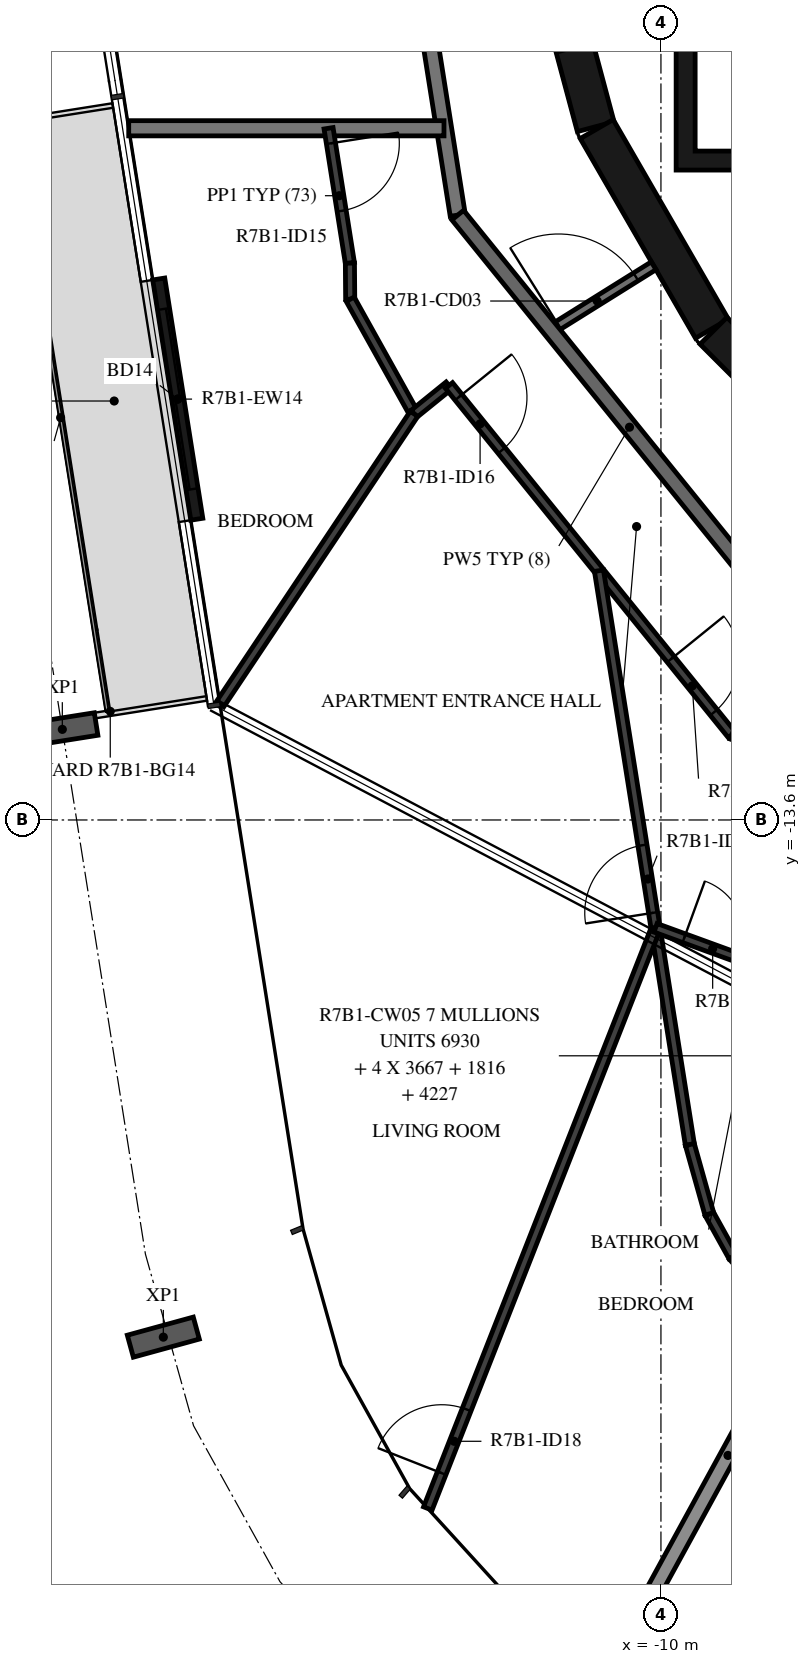
"""IFC4 building model, lengths in metres.
Left out: names, types, materials, properties, quantities, classifications, styles, units other than length and angle.
Written with IfcOpenShell. Run it as: python <this file> out.ifc"""

import sys

from ifc_helpers import new_model, si_unit, direction, frame, frame_2d, origin, origin_2d, place, context, subcontext, project, spatial, polyline, rectangle, i_section, outline, extrude, element, fill, save


model = new_model("IFC4")
c1 = context("Model", 3, precision=1e-05, world=origin(), true_north=direction((0.0, 1.0)))
c2 = subcontext(c1, "Body", "Model", "MODEL_VIEW")
j1 = project(units=[si_unit("LENGTHUNIT", "METRE"), si_unit("PLANEANGLEUNIT", "RADIAN")], contexts=[c1])
p1 = place(None, origin())
s1 = spatial("IfcSite", under=j1, at=p1, CompositionType="ELEMENT")
p2 = place(p1, origin())
s2 = spatial("IfcBuilding", under=s1, at=p2, CompositionType="ELEMENT")
p3 = place(p2, frame((0.0, 0.0, 273.9)))
s3 = spatial("IfcBuildingStorey", under=s2, at=p3, CompositionType="ELEMENT", Elevation=273.9)
for number, where, z_axis, x_axis in (
    (1, (-17.875, -12.408, -0.38), (0.0, 0.0, 1.0), (-0.156, 0.988, 0.0)),
    (2, (-16.547, -20.404, -0.38), (0.0, 0.0, 1.0), (-0.265, 0.964, 0.0)),
):
    element("IfcColumn", number, at=place(p3, frame(where, z_axis=z_axis, x_axis=x_axis)), inside=s3, PredefinedType="COLUMN", context=c2, shape_type="SweptSolid", body=[
        extrude(i_section(OverallWidth=0.3, OverallDepth=0.9, WebThickness=0.019, FlangeThickness=0.035, FilletRadius=0.03, at=origin_2d()), origin(), (0.0, 0.0, 1.0), 3.5),
    ])
p4 = place(p3, frame((-16.607, -6.483, 0.0), z_axis=(0.0, 0.0, 1.0), x_axis=(0.156401347891, -0.987693585267, 0.0)))
e3 = element("IfcWall", 3, at=p4, inside=s3, PredefinedType="STANDARD", context=c2, shape_type="SweptSolid", body=[
    extrude(rectangle(XDim=3.2, YDim=0.16, at=frame_2d((1.6, 0.0))), origin(), (0.0, 0.0, 1.0), 3.12),
])
p5 = place(p4, frame((0.4, 0.0, 0.0)))
e4 = element("IfcOpeningElement", 4, at=p5, cuts=e3, PredefinedType="OPENING", context=c2, shape_type="SweptSolid", body=[
    extrude(rectangle(XDim=2.4, YDim=2.4, at=frame_2d((1.2, 1.2))), frame((0.0, 0.09, 0.0), z_axis=(0.0, -1.0, 0.0), x_axis=(1.0, 0.0, 0.0)), (0.0, 0.0, 1.0), 0.18),
])
p6 = place(p3, frame((-11.643, -1.55, 0.0), z_axis=(0.0, 0.0, 1.0), x_axis=(0.258734743916, -0.965948410781, 0.0)))
e5 = element("IfcWall", 5, at=p6, inside=s3, PredefinedType="SHEAR", context=c2, shape_type="SweptSolid", body=[
    extrude(rectangle(XDim=3.033, YDim=0.5, at=frame_2d((1.516, 0.0))), origin(), (0.0, 0.0, 1.0), 3.12),
])
p7 = place(p6, frame((1.066, 0.0, 0.0)))
e6 = element("IfcOpeningElement", 6, at=p7, cuts=e5, PredefinedType="OPENING", context=c2, shape_type="SweptSolid", body=[
    extrude(rectangle(XDim=0.9, YDim=2.1, at=frame_2d((0.45, 1.05))), frame((0.0, 0.26, 0.0), z_axis=(0.0, -1.0, 0.0), x_axis=(1.0, 0.0, 0.0)), (0.0, 0.0, 1.0), 0.52),
])
p8 = place(p3, frame((-10.845, -4.51, 0.0), z_axis=(0.0, 0.0, 1.0), x_axis=(0.500087131594, -0.865975092491, 0.0)))
e7 = element("IfcWall", 7, at=p8, inside=s3, PredefinedType="SHEAR", context=c2, shape_type="SweptSolid", body=[
    extrude(rectangle(XDim=3.033, YDim=0.5, at=frame_2d((1.516, 0.0))), origin(), (0.0, 0.0, 1.0), 3.12),
])
p9 = place(p3, frame((-9.308, -7.164, 0.0), z_axis=(0.0, 0.0, 1.0), x_axis=(0.707106781187, -0.707106781187, 0.0)))
e8 = element("IfcWall", 8, at=p9, inside=s3, PredefinedType="SHEAR", context=c2, shape_type="SweptSolid", body=[
    extrude(rectangle(XDim=3.032, YDim=0.5, at=frame_2d((1.516, 0.0))), origin(), (0.0, 0.0, 1.0), 3.12),
])
p10 = place(p3, origin())
e9 = element("IfcWall", 9, at=p10, inside=s3, PredefinedType="SHEAR", context=c2, shape_type="SweptSolid", body=[
    extrude(outline(polyline([(9.8, -5.05), (9.8, -4.8), (9.8, -1.9), (9.55, -1.9), (9.55, -4.8), (7.65, -4.8), (7.65, -1.9), (7.4, -1.9), (7.4, -4.8), (5.5, -4.8), (5.5, -1.9), (5.25, -1.9), (5.25, -4.8), (3.35, -4.8), (3.35, -1.9), (3.1, -1.9), (3.1, -4.8), (1.2, -4.8), (1.2, -1.9), (0.95, -1.9), (0.95, -4.8), (-0.95, -4.8), (-0.95, -1.9), (-1.2, -1.9), (-1.2, -4.8), (-3.1, -4.8), (-3.1, -1.9), (-3.35, -1.9), (-3.35, -4.8), (-5.25, -4.8), (-5.25, -1.9), (-5.5, -1.9), (-5.5, -4.8), (-9.55, -4.8), (-9.55, -1.9), (-9.8, -1.9), (-9.8, -4.8), (-9.8, -5.05), (9.8, -5.05)])), origin(), (0.0, 0.0, 1.0), 3.12),
])
p11 = place(p3, frame((-11.449, -7.154, 0.0), z_axis=(0.0, 0.0, 1.0), x_axis=(0.848067047543, 0.529888934468, 0.0)))
e10 = element("IfcWall", 10, at=p11, inside=s3, PredefinedType="PARTITIONING", context=c2, shape_type="SweptSolid", body=[
    extrude(rectangle(XDim=1.596, YDim=0.12, at=frame_2d((0.798, 0.0))), origin(), (0.0, 0.0, 1.0), 3.12),
])
p12 = place(p11, frame((0.12, 0.0, 0.0)))
e11 = element("IfcOpeningElement", 11, at=p12, cuts=e10, PredefinedType="OPENING", context=c2, shape_type="SweptSolid", body=[
    extrude(rectangle(XDim=1.2, YDim=2.1, at=frame_2d((0.6, 1.05))), frame((0.0, 0.07, 0.0), z_axis=(0.0, -1.0, 0.0), x_axis=(1.0, 0.0, 0.0)), (0.0, 0.0, 1.0), 0.14),
])
p13 = place(p3, frame((-13.797, 1.45, 0.0), z_axis=(0.0, 0.0, 1.0), x_axis=(0.156421704315, -0.987690361611, 0.0)))
e12 = element("IfcWall", 12, at=p13, inside=s3, PredefinedType="STANDARD", context=c2, shape_type="SweptSolid", body=[
    extrude(rectangle(XDim=7.181, YDim=0.2, at=frame_2d((3.591, 0.0))), origin(), (0.0, 0.0, 1.0), 3.12),
])
p14 = place(p3, frame((-12.673, -5.643, 0.0), z_axis=(0.0, 0.0, 1.0), x_axis=(0.629302871585, -0.777160148113, 0.0)))
e13 = element("IfcWall", 13, at=p14, inside=s3, PredefinedType="STANDARD", context=c2, shape_type="SweptSolid", body=[
    extrude(rectangle(XDim=7.181, YDim=0.2, at=frame_2d((3.59, 0.0))), origin(), (0.0, 0.0, 1.0), 3.12),
])
p15 = place(p3, frame((-17.002, -4.5, 0.0), z_axis=(0.0, 0.0, 1.0), x_axis=(1.0, 0.0, 0.0)))
e14 = element("IfcWall", 14, at=p15, inside=s3, PredefinedType="STANDARD", context=c2, shape_type="SweptSolid", body=[
    extrude(rectangle(XDim=4.148, YDim=0.2, at=frame_2d((2.074, 0.0))), origin(), (0.0, 0.0, 1.0), 3.12),
])
p16 = place(p3, frame((-10.637, -24.738, 0.0), z_axis=(0.0, 0.0, 1.0), x_axis=(0.479683887596, 0.877441375808, 0.0)))
e15 = element("IfcWall", 15, at=p16, inside=s3, PredefinedType="STANDARD", context=c2, shape_type="SweptSolid", body=[
    extrude(rectangle(XDim=6.333, YDim=0.2, at=frame_2d((3.166, 0.0))), origin(), (0.0, 0.0, 1.0), 2.73),
])
p17 = place(p3, frame((-14.373, -4.5, 0.0), z_axis=(0.0, 0.0, 1.0), x_axis=(0.156437152886, -0.987687914878, 0.0)))
e16 = element("IfcWall", 16, at=p17, inside=s3, PredefinedType="PARTITIONING", context=c2, shape_type="SweptSolid", body=[
    extrude(rectangle(XDim=1.796, YDim=0.12, at=frame_2d((0.898, 0.0))), origin(), (0.0, 0.0, 1.0), 3.12),
])
p18 = place(p17, frame((0.2, 0.0, 0.0)))
e17 = element("IfcOpeningElement", 17, at=p18, cuts=e16, PredefinedType="OPENING", context=c2, shape_type="SweptSolid", body=[
    extrude(rectangle(XDim=0.9, YDim=2.1, at=frame_2d((0.45, 1.05))), frame((0.0, 0.07, 0.0), z_axis=(0.0, -1.0, 0.0), x_axis=(1.0, 0.0, 0.0)), (0.0, 0.0, 1.0), 0.14),
])
p19 = place(p3, frame((-14.092, -6.274, 0.0), z_axis=(0.0, 0.0, 1.0), x_axis=(0.008221715939, -0.999966201122, 0.0)))
e18 = element("IfcWall", 18, at=p19, inside=s3, PredefinedType="PARTITIONING", context=c2, shape_type="SweptSolid", body=[
    extrude(rectangle(XDim=0.475, YDim=0.12, at=frame_2d((0.238, 0.0))), origin(), (0.0, 0.0, 1.0), 3.12),
])
p20 = place(p3, frame((-14.088, -6.749, 0.0), z_axis=(0.0, 0.0, 1.0), x_axis=(0.486723752783, -0.873555944675, 0.0)))
e19 = element("IfcWall", 19, at=p20, inside=s3, PredefinedType="PARTITIONING", context=c2, shape_type="SweptSolid", body=[
    extrude(rectangle(XDim=1.726, YDim=0.12, at=frame_2d((0.863, 0.0))), origin(), (0.0, 0.0, 1.0), 3.12),
])
p21 = place(p3, frame((-13.248, -8.257, 0.0), z_axis=(0.0, 0.0, 1.0), x_axis=(0.777071947771, 0.629411779352, 0.0)))
e20 = element("IfcWall", 20, at=p21, inside=s3, PredefinedType="PARTITIONING", context=c2, shape_type="SweptSolid", body=[
    extrude(rectangle(XDim=0.592, YDim=0.12, at=frame_2d((0.296, 0.0))), origin(), (0.0, 0.0, 1.0), 3.12),
])
p22 = place(p3, frame((-12.788, -7.884, 0.0), z_axis=(0.0, 0.0, 1.0), x_axis=(0.6293312414, -0.777137174891, 0.0)))
e21 = element("IfcWall", 21, at=p22, inside=s3, PredefinedType="PARTITIONING", context=c2, shape_type="SweptSolid", body=[
    extrude(rectangle(XDim=5.913, YDim=0.12, at=frame_2d((2.957, 0.0))), origin(), (0.0, 0.0, 1.0), 3.12),
])
p23 = place(p22, frame((0.2, 0.0, 0.0)))
e22 = element("IfcOpeningElement", 22, at=p23, cuts=e21, PredefinedType="OPENING", context=c2, shape_type="SweptSolid", body=[
    extrude(rectangle(XDim=0.9, YDim=2.1, at=frame_2d((0.45, 1.05))), frame((0.0, 0.07, 0.0), z_axis=(0.0, -1.0, 0.0), x_axis=(1.0, 0.0, 0.0)), (0.0, 0.0, 1.0), 0.14),
])
p24 = place(p22, frame((4.635, 0.0, 0.0)))
e23 = element("IfcOpeningElement", 23, at=p24, cuts=e21, PredefinedType="OPENING", context=c2, shape_type="SweptSolid", body=[
    extrude(rectangle(XDim=0.9, YDim=2.1, at=frame_2d((0.45, 1.05))), frame((0.0, 0.07, 0.0), z_axis=(0.0, -1.0, 0.0), x_axis=(1.0, 0.0, 0.0)), (0.0, 0.0, 1.0), 0.14),
])
p25 = place(p3, frame((-9.067, -12.479, 0.0), z_axis=(0.0, 0.0, 1.0), x_axis=(0.933579449035, -0.358370495911, 0.0)))
e24 = element("IfcWall", 24, at=p25, inside=s3, PredefinedType="PARTITIONING", context=c2, shape_type="SweptSolid", body=[
    extrude(rectangle(XDim=7.985, YDim=0.12, at=frame_2d((3.992, 0.0))), origin(), (0.0, 0.0, 1.0), 3.12),
])
p26 = place(p25, frame((4.192, 0.0, 0.0)))
e25 = element("IfcOpeningElement", 25, at=p26, cuts=e24, PredefinedType="OPENING", context=c2, shape_type="SweptSolid", body=[
    extrude(rectangle(XDim=0.9, YDim=2.1, at=frame_2d((0.45, 1.05))), frame((0.0, 0.07, 0.0), z_axis=(0.0, -1.0, 0.0), x_axis=(1.0, 0.0, 0.0)), (0.0, 0.0, 1.0), 0.14),
])
p27 = place(p3, frame((-15.802, -12.08, 0.0), z_axis=(0.0, 0.0, 1.0), x_axis=(0.555386305099, 0.831592479589, 0.0)))
e26 = element("IfcWall", 26, at=p27, inside=s3, PredefinedType="PARTITIONING", context=c2, shape_type="SweptSolid", body=[
    extrude(rectangle(XDim=4.597, YDim=0.12, at=frame_2d((2.299, 0.0))), origin(), (0.0, 0.0, 1.0), 3.12),
])
p28 = place(p3, frame((-9.619, -17.871, 0.0), z_axis=(0.0, 0.0, 1.0), x_axis=(-0.156433255633, 0.987688532146, 0.0)))
e27 = element("IfcWall", 27, at=p28, inside=s3, PredefinedType="PARTITIONING", context=c2, shape_type="SweptSolid", body=[
    extrude(rectangle(XDim=7.644, YDim=0.12, at=frame_2d((3.822, 0.0))), origin(), (0.0, 0.0, 1.0), 3.12),
])
p29 = place(p28, frame((3.087, 0.0, 0.0)))
e28 = element("IfcOpeningElement", 28, at=p29, cuts=e27, PredefinedType="OPENING", context=c2, shape_type="SweptSolid", body=[
    extrude(rectangle(XDim=0.9, YDim=2.1, at=frame_2d((0.45, 1.05))), frame((0.0, 0.07, 0.0), z_axis=(0.0, -1.0, 0.0), x_axis=(1.0, 0.0, 0.0)), (0.0, 0.0, 1.0), 0.14),
])
p30 = place(p3, frame((-13.067, -22.658, 0.0), z_axis=(0.0, 0.0, 1.0), x_axis=(0.365785999331, 0.930698986082, 0.0)))
e29 = element("IfcWall", 29, at=p30, inside=s3, PredefinedType="PARTITIONING", context=c2, shape_type="SweptSolid", body=[
    extrude(rectangle(XDim=8.196, YDim=0.12, at=frame_2d((4.098, 0.0))), origin(), (0.0, 0.0, 1.0), 3.12),
])
p31 = place(p30, frame((0.5, 0.0, 0.0)))
e30 = element("IfcOpeningElement", 30, at=p31, cuts=e29, PredefinedType="OPENING", context=c2, shape_type="SweptSolid", body=[
    extrude(rectangle(XDim=0.9, YDim=2.1, at=frame_2d((0.45, 1.05))), frame((0.0, 0.07, 0.0), z_axis=(0.0, -1.0, 0.0), x_axis=(1.0, 0.0, 0.0)), (0.0, 0.0, 1.0), 0.14),
])
p32 = place(p3, frame((-10.071, -15.019, 0.0), z_axis=(0.0, 0.0, 1.0), x_axis=(0.939648507355, -0.34214131967, 0.0)))
e31 = element("IfcWall", 31, at=p32, inside=s3, PredefinedType="PARTITIONING", context=c2, shape_type="SweptSolid", body=[
    extrude(rectangle(XDim=3.691, YDim=0.12, at=frame_2d((1.846, 0.0))), origin(), (0.0, 0.0, 1.0), 3.12),
])
p33 = place(p32, frame((0.4, 0.0, 0.0)))
e32 = element("IfcOpeningElement", 32, at=p33, cuts=e31, PredefinedType="OPENING", context=c2, shape_type="SweptSolid", body=[
    extrude(rectangle(XDim=0.8, YDim=2.1, at=frame_2d((0.4, 1.05))), frame((0.0, 0.07, 0.0), z_axis=(0.0, -1.0, 0.0), x_axis=(1.0, 0.0, 0.0)), (0.0, 0.0, 1.0), 0.14),
])
for number, where, z_axis, x_axis in (
    (33, (-8.62, -19.818, 0.0), (0.0, 0.0, 1.0), (-0.673, 0.739, 0.0)),
    (34, (-9.052, -19.344, 0.0), (0.0, 0.0, 1.0), (-0.485, 0.874, 0.0)),
):
    element("IfcWall", number, at=place(p3, frame(where, z_axis=z_axis, x_axis=x_axis)), inside=s3, PredefinedType="PARTITIONING", context=c2, shape_type="SweptSolid", body=[
        extrude(rectangle(XDim=0.642, YDim=0.12, at=frame_2d((0.321, 0.0))), origin(), (0.0, 0.0, 1.0), 3.12),
    ])
p34 = place(p3, frame((-9.364, -18.782, 0.0), z_axis=(0.0, 0.0, 1.0), x_axis=(-0.269811707714, 0.962913102196, 0.0)))
e35 = element("IfcWall", 35, at=p34, inside=s3, PredefinedType="PARTITIONING", context=c2, shape_type="SweptSolid", body=[
    extrude(rectangle(XDim=0.947, YDim=0.12, at=frame_2d((0.473, 0.0))), origin(), (0.0, 0.0, 1.0), 3.12),
])
p35 = place(p5, origin())
e36 = element("IfcDoor", 36, at=p35, inside=s3, OperationType="DOUBLE_DOOR_SLIDING", PredefinedType="DOOR", context=c2, shape_type="SweptSolid", body=[
    extrude(rectangle(XDim=2.4, YDim=2.4, at=frame_2d((1.2, 1.2))), frame((0.0, 0.025, 0.0), z_axis=(0.0, -1.0, 0.0), x_axis=(1.0, 0.0, 0.0)), (0.0, 0.0, 1.0), 0.05),
])
fill(e4, e36)
p36 = place(p18, origin())
e37 = element("IfcDoor", 37, at=p36, inside=s3, OperationType="SINGLE_SWING_RIGHT", PredefinedType="DOOR", context=c2, shape_type="SweptSolid", body=[
    extrude(rectangle(XDim=0.9, YDim=2.1, at=frame_2d((0.45, 1.05))), frame((0.0, 0.025, 0.0), z_axis=(0.0, -1.0, 0.0), x_axis=(1.0, 0.0, 0.0)), (0.0, 0.0, 1.0), 0.05),
])
fill(e17, e37)
p37 = place(p23, origin())
e38 = element("IfcDoor", 38, at=p37, inside=s3, OperationType="SINGLE_SWING_RIGHT", PredefinedType="DOOR", context=c2, shape_type="SweptSolid", body=[
    extrude(rectangle(XDim=0.9, YDim=2.1, at=frame_2d((0.45, 1.05))), frame((0.0, 0.025, 0.0), z_axis=(0.0, -1.0, 0.0), x_axis=(1.0, 0.0, 0.0)), (0.0, 0.0, 1.0), 0.05),
])
fill(e22, e38)
p38 = place(p24, origin())
e39 = element("IfcDoor", 39, at=p38, inside=s3, OperationType="SINGLE_SWING_RIGHT", PredefinedType="DOOR", context=c2, shape_type="SweptSolid", body=[
    extrude(rectangle(XDim=0.9, YDim=2.1, at=frame_2d((0.45, 1.05))), frame((0.0, 0.025, 0.0), z_axis=(0.0, -1.0, 0.0), x_axis=(1.0, 0.0, 0.0)), (0.0, 0.0, 1.0), 0.05),
])
fill(e23, e39)
p39 = place(p31, origin())
e40 = element("IfcDoor", 40, at=p39, inside=s3, OperationType="SINGLE_SWING_RIGHT", PredefinedType="DOOR", context=c2, shape_type="SweptSolid", body=[
    extrude(rectangle(XDim=0.9, YDim=2.1, at=frame_2d((0.45, 1.05))), frame((0.0, 0.025, 0.0), z_axis=(0.0, -1.0, 0.0), x_axis=(1.0, 0.0, 0.0)), (0.0, 0.0, 1.0), 0.05),
])
fill(e30, e40)
p40 = place(p33, origin())
e41 = element("IfcDoor", 41, at=p40, inside=s3, OperationType="SINGLE_SWING_RIGHT", PredefinedType="DOOR", context=c2, shape_type="SweptSolid", body=[
    extrude(rectangle(XDim=0.8, YDim=2.1, at=frame_2d((0.4, 1.05))), frame((0.0, 0.025, 0.0), z_axis=(0.0, -1.0, 0.0), x_axis=(1.0, 0.0, 0.0)), (0.0, 0.0, 1.0), 0.05),
])
fill(e32, e41)
p41 = place(p29, origin())
e42 = element("IfcDoor", 42, at=p41, inside=s3, OperationType="SINGLE_SWING_LEFT", PredefinedType="DOOR", context=c2, shape_type="SweptSolid", body=[
    extrude(rectangle(XDim=0.9, YDim=2.1, at=frame_2d((0.45, 1.05))), frame((0.0, 0.025, 0.0), z_axis=(0.0, -1.0, 0.0), x_axis=(1.0, 0.0, 0.0)), (0.0, 0.0, 1.0), 0.05),
])
fill(e28, e42)
p42 = place(p12, origin())
e43 = element("IfcDoor", 43, at=p42, inside=s3, OperationType="DOUBLE_DOOR_SINGLE_SWING", PredefinedType="DOOR", context=c2, shape_type="SweptSolid", body=[
    extrude(rectangle(XDim=1.2, YDim=2.1, at=frame_2d((0.6, 1.05))), frame((0.0, 0.025, 0.0), z_axis=(0.0, -1.0, 0.0), x_axis=(1.0, 0.0, 0.0)), (0.0, 0.0, 1.0), 0.05),
])
fill(e11, e43)
save(model, sys.argv[1])
